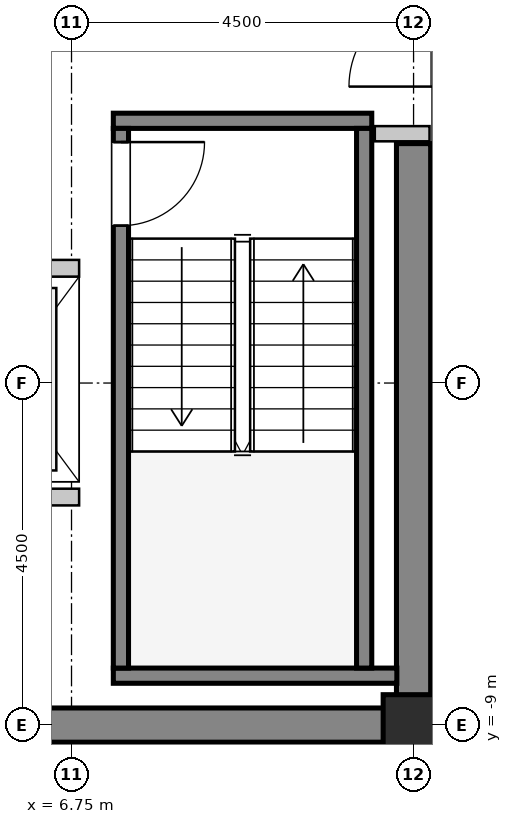
"""IFC4 building model, lengths in metres.
Left out: names, types, materials, properties, quantities, classifications, styles, units other than length and angle.
Written with IfcOpenShell. Run it as: python <this file> out.ifc"""

import sys

from ifc_helpers import new_model, si_unit, direction, frame, frame_2d, origin, origin_2d, place, context, subcontext, project, spatial, rectangle, hollow_rectangle, extrude, source, transform, mapped, element, fill, save


model = new_model("IFC4")
c1 = context("Model", 3, precision=1e-05, world=origin(), true_north=direction((0.0, 1.0)))
c2 = subcontext(c1, "Body", "Model", "MODEL_VIEW")
j1 = project(units=[si_unit("LENGTHUNIT", "METRE"), si_unit("PLANEANGLEUNIT", "RADIAN")], contexts=[c1])
p1 = place(None, origin())
s1 = spatial("IfcSite", under=j1, at=p1, CompositionType="ELEMENT")
p2 = place(p1, origin())
s2 = spatial("IfcBuilding", under=s1, at=p2, CompositionType="ELEMENT")
p3 = place(p2, frame((0.0, 0.0, 225.6)))
s3 = spatial("IfcBuildingStorey", under=s2, at=p3, CompositionType="ELEMENT", Elevation=225.6)
m1 = source(origin(), c2, "Body", "SweptSolid", [
    extrude(rectangle(XDim=9.925, YDim=0.45, at=frame_2d((4.962, 0.0))), origin(), (0.0, 0.0, 1.0), 3.8),
])
p4 = place(p3, frame((1.55, -9.0, 0.0), z_axis=(0.0, 0.0, 1.0), x_axis=(1.0, 0.0, 0.0)))
e1 = element("IfcWall", 1, at=p4, inside=s3, PredefinedType="SHEAR", context=c2, shape_type="MappedRepresentation", body=[
    mapped(m1, transform((0.0, 0.0, 0.0), x_axis=(1.0, 0.0, 0.0), y_axis=(0.0, 1.0, 0.0), z_axis=(0.0, 0.0, 1.0), scale=1.0)),
])
m2 = source(origin(), c2, "Body", "SweptSolid", [
    extrude(rectangle(XDim=7.425, YDim=0.45, at=frame_2d((3.712, 0.0))), origin(), (0.0, 0.0, 1.0), 3.8),
])
p5 = place(p3, frame((11.25, -8.775, 0.0), z_axis=(0.0, 0.0, 1.0), x_axis=(0.0, 1.0, 0.0)))
e2 = element("IfcWall", 2, at=p5, inside=s3, PredefinedType="SHEAR", context=c2, shape_type="MappedRepresentation", body=[
    mapped(m2, transform((0.0, 0.0, 0.0), x_axis=(1.0, 0.0, 0.0), y_axis=(0.0, 1.0, 0.0), z_axis=(0.0, 0.0, 1.0), scale=1.0)),
])
m3 = source(origin(), c2, "Body", "SweptSolid", [
    extrude(hollow_rectangle(XDim=0.8, YDim=0.8, WallThickness=0.04, InnerFilletRadius=0.04, OuterFilletRadius=0.08, at=origin_2d()), origin(), (0.0, 0.0, 1.0), 3.8),
])
p6 = place(p3, frame((11.25, -9.0, 0.0), z_axis=(0.0, 0.0, 1.0), x_axis=(1.0, 0.0, 0.0)))
e3 = element("IfcColumn", 3, at=p6, inside=s3, PredefinedType="COLUMN", context=c2, shape_type="MappedRepresentation", body=[
    mapped(m3, transform((0.0, 0.0, 0.0), x_axis=(1.0, 0.0, 0.0), y_axis=(0.0, 1.0, 0.0), z_axis=(0.0, 0.0, 1.0), scale=1.0)),
])
m4 = source(origin(), c2, "Body", "SweptSolid", [
    extrude(rectangle(XDim=3.4, YDim=0.2, at=frame_2d((1.7, 0.0))), origin(), (0.0, 0.0, 1.0), 3.8),
])
p7 = place(p3, frame((7.3, -1.05, 0.0), z_axis=(0.0, 0.0, 1.0), x_axis=(1.0, 0.0, 0.0)))
e4 = element("IfcWall", 4, at=p7, inside=s3, PredefinedType="SOLIDWALL", context=c2, shape_type="MappedRepresentation", body=[
    mapped(m4, transform((0.0, 0.0, 0.0), x_axis=(1.0, 0.0, 0.0), y_axis=(0.0, 1.0, 0.0), z_axis=(0.0, 0.0, 1.0), scale=1.0)),
])
m5 = source(origin(), c2, "Body", "SweptSolid", [
    extrude(rectangle(XDim=3.73, YDim=0.2, at=frame_2d((1.865, 0.0))), origin(), (0.0, 0.0, 1.0), 3.8),
])
p8 = place(p3, frame((7.3, -8.35, 0.0), z_axis=(0.0, 0.0, 1.0), x_axis=(1.0, 0.0, 0.0)))
e5 = element("IfcWall", 5, at=p8, inside=s3, PredefinedType="SOLIDWALL", context=c2, shape_type="MappedRepresentation", body=[
    mapped(m5, transform((0.0, 0.0, 0.0), x_axis=(1.0, 0.0, 0.0), y_axis=(0.0, 1.0, 0.0), z_axis=(0.0, 0.0, 1.0), scale=1.0)),
])
m6 = source(origin(), c2, "Body", "SweptSolid", [
    extrude(rectangle(XDim=7.1, YDim=0.2, at=frame_2d((3.55, 0.0))), origin(), (0.0, 0.0, 1.0), 3.8),
])
p9 = place(p3, frame((7.4, -1.15, 0.0), z_axis=(0.0, 0.0, 1.0), x_axis=(0.0, -1.0, 0.0)))
e6 = element("IfcWall", 6, at=p9, inside=s3, PredefinedType="SOLIDWALL", context=c2, shape_type="MappedRepresentation", body=[
    mapped(m6, transform((0.0, 0.0, 0.0), x_axis=(1.0, 0.0, 0.0), y_axis=(0.0, 1.0, 0.0), z_axis=(0.0, 0.0, 1.0), scale=1.0)),
])
p10 = place(p9, frame((0.18, 0.0, 0.0)))
e7 = element("IfcOpeningElement", 7, at=p10, cuts=e6, PredefinedType="OPENING", context=c2, shape_type="SweptSolid", body=[
    extrude(rectangle(XDim=1.1, YDim=2.15, at=frame_2d((0.55, 1.075))), frame((0.0, 0.11, 0.0), z_axis=(0.0, -1.0, 0.0), x_axis=(1.0, 0.0, 0.0)), (0.0, 0.0, 1.0), 0.22),
])
p11 = place(p3, frame((10.6, -1.15, 0.0), z_axis=(0.0, 0.0, 1.0), x_axis=(0.0, -1.0, 0.0)))
e8 = element("IfcWall", 8, at=p11, inside=s3, PredefinedType="SOLIDWALL", context=c2, shape_type="MappedRepresentation", body=[
    mapped(m6, transform((0.0, 0.0, 0.0), x_axis=(1.0, 0.0, 0.0), y_axis=(0.0, 1.0, 0.0), z_axis=(0.0, 0.0, 1.0), scale=1.0)),
])
m7 = source(origin(), c2, "Body", "SweptSolid", [
    extrude(rectangle(XDim=2.0, YDim=0.22, at=frame_2d((1.0, 0.0))), origin(), (0.0, 0.0, 1.0), 3.535),
])
p12 = place(p3, frame((6.85, -2.99, 0.0), z_axis=(0.0, 0.0, 1.0), x_axis=(-1.0, 0.0, 0.0)))
e9 = element("IfcWall", 9, at=p12, inside=s3, PredefinedType="SOLIDWALL", context=c2, shape_type="MappedRepresentation", body=[
    mapped(m7, transform((0.0, 0.0, 0.0), x_axis=(1.0, 0.0, 0.0), y_axis=(0.0, 1.0, 0.0), z_axis=(0.0, 0.0, 1.0), scale=1.0)),
])
p13 = place(p12, frame((0.4, 0.0, 0.0)))
e10 = element("IfcOpeningElement", 10, at=p13, cuts=e9, PredefinedType="OPENING", context=c2, shape_type="SweptSolid", body=[
    extrude(rectangle(XDim=1.2, YDim=2.2, at=frame_2d((0.6, 1.1))), frame((0.0, 0.12, 0.0), z_axis=(0.0, -1.0, 0.0), x_axis=(1.0, 0.0, 0.0)), (0.0, 0.0, 1.0), 0.24),
])
m8 = source(origin(), c2, "Body", "SweptSolid", [
    extrude(rectangle(XDim=2.095, YDim=0.22, at=frame_2d((1.048, 0.0))), origin(), (0.0, 0.0, 1.0), 3.535),
])
p14 = place(p3, frame((4.755, -6.0, 0.0), z_axis=(0.0, 0.0, 1.0), x_axis=(1.0, 0.0, 0.0)))
e11 = element("IfcWall", 11, at=p14, inside=s3, PredefinedType="SOLIDWALL", context=c2, shape_type="MappedRepresentation", body=[
    mapped(m8, transform((0.0, 0.0, 0.0), x_axis=(1.0, 0.0, 0.0), y_axis=(0.0, 1.0, 0.0), z_axis=(0.0, 0.0, 1.0), scale=1.0)),
])
m9 = source(origin(), c2, "Body", "SweptSolid", [
    extrude(rectangle(XDim=0.72, YDim=0.2, at=frame_2d((0.36, 0.0))), origin(), (0.0, 0.0, 1.0), 3.535),
])
p15 = place(p3, frame((10.74, -1.22, 0.0), z_axis=(0.0, 0.0, 1.0), x_axis=(1.0, 0.0, 0.0)))
e12 = element("IfcWall", 12, at=p15, inside=s3, PredefinedType="PARTITIONING", context=c2, shape_type="MappedRepresentation", body=[
    mapped(m9, transform((0.0, 0.0, 0.0), x_axis=(1.0, 0.0, 0.0), y_axis=(0.0, 1.0, 0.0), z_axis=(0.0, 0.0, 1.0), scale=1.0)),
])
m10 = source(origin(), c2, "Body", "SweptSolid", [
    extrude(rectangle(XDim=1.1, YDim=2.15, at=frame_2d((0.55, 1.075))), frame((0.0, 0.025, 0.0), z_axis=(0.0, -1.0, 0.0), x_axis=(1.0, 0.0, 0.0)), (0.0, 0.0, 1.0), 0.05),
])
p16 = place(p10, origin())
e13 = element("IfcDoor", 13, at=p16, inside=s3, OperationType="SINGLE_SWING_LEFT", PredefinedType="DOOR", context=c2, shape_type="MappedRepresentation", body=[
    mapped(m10, transform((0.0, 0.0, 0.0), x_axis=(1.0, 0.0, 0.0), y_axis=(0.0, 1.0, 0.0), z_axis=(0.0, 0.0, 1.0), scale=1.0)),
])
fill(e7, e13)
save(model, sys.argv[1])
